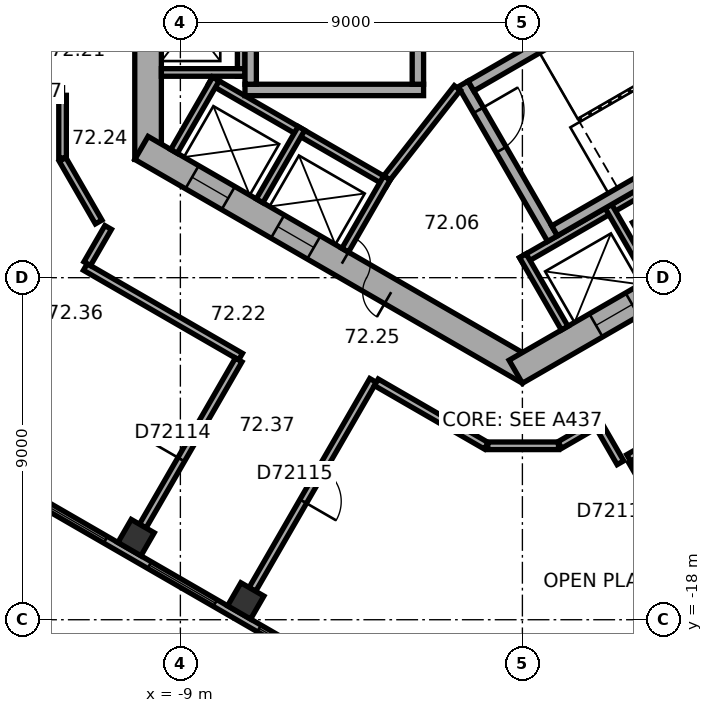
"""IFC4 building model, lengths in metres.
Left out: names, types, materials, properties, quantities, classifications, styles, units other than length and angle.
Written with IfcOpenShell. Run it as: python <this file> out.ifc"""

import sys

from ifc_helpers import new_model, si_unit, direction, frame, frame_2d, origin, origin_2d, place, context, subcontext, project, spatial, rectangle, extrude, element, fill, save


model = new_model("IFC4")
c1 = context("Model", 3, precision=1e-05, world=origin(), true_north=direction((0.0, 1.0)))
c2 = subcontext(c1, "Body", "Model", "MODEL_VIEW")
j1 = project(units=[si_unit("LENGTHUNIT", "METRE"), si_unit("PLANEANGLEUNIT", "RADIAN")], contexts=[c1])
p1 = place(None, origin())
s1 = spatial("IfcSite", under=j1, at=p1, CompositionType="ELEMENT")
p2 = place(p1, origin())
s2 = spatial("IfcBuilding", under=s1, at=p2, CompositionType="ELEMENT")
p3 = place(p2, frame((0.0, 0.0, 293.1)))
s3 = spatial("IfcBuildingStorey", under=s2, at=p3, CompositionType="ELEMENT", Elevation=293.1)
for number, where, z_axis, x_axis in (
    (1, (-10.165, -15.84, 0.0), (0.0, 0.0, 1.0), (0.866, -0.5, 0.0)),
    (2, (-7.28, -17.505, 0.0), (0.0, 0.0, 1.0), (0.866, -0.5, 0.0)),
):
    element("IfcColumn", number, at=place(p3, frame(where, z_axis=z_axis, x_axis=x_axis)), inside=s3, PredefinedType="COLUMN", context=c2, shape_type="SweptSolid", body=[
        extrude(rectangle(XDim=0.7, YDim=0.7, at=origin_2d()), origin(), (0.0, 0.0, 1.0), 3.7),
    ])
p4 = place(p3, frame((-9.85, 5.889, 0.0), z_axis=(0.0, 0.0, 1.0), x_axis=(0.0, -1.0, 0.0)))
e3 = element("IfcWall", 3, at=p4, inside=s3, PredefinedType="SHEAR", context=c2, shape_type="SweptSolid", body=[
    extrude(rectangle(XDim=11.778, YDim=0.7, at=frame_2d((5.889, 0.0))), origin(), (0.0, 0.0, 1.0), 3.7),
])
p5 = place(p4, frame((5.039, 0.0, 0.0)))
e4 = element("IfcOpeningElement", 4, at=p5, cuts=e3, PredefinedType="OPENING", context=c2, shape_type="SweptSolid", body=[
    extrude(rectangle(XDim=1.1, YDim=2.1, at=frame_2d((0.55, 1.05))), frame((0.0, 0.36, 0.0), z_axis=(0.0, -1.0, 0.0), x_axis=(1.0, 0.0, 0.0)), (0.0, 0.0, 1.0), 0.72),
])
p6 = place(p4, frame((7.639, 0.0, 0.0)))
e5 = element("IfcOpeningElement", 5, at=p6, cuts=e3, PredefinedType="OPENING", context=c2, shape_type="SweptSolid", body=[
    extrude(rectangle(XDim=1.1, YDim=2.1, at=frame_2d((0.55, 1.05))), frame((0.0, 0.36, 0.0), z_axis=(0.0, -1.0, 0.0), x_axis=(1.0, 0.0, 0.0)), (0.0, 0.0, 1.0), 0.72),
])
p7 = place(p3, frame((-10.025, -5.586, 0.0), z_axis=(0.0, 0.0, 1.0), x_axis=(0.866026453023, -0.499998182661, 0.0)))
e6 = element("IfcWall", 6, at=p7, inside=s3, PredefinedType="SHEAR", context=c2, shape_type="SweptSolid", body=[
    extrude(rectangle(XDim=11.778, YDim=0.7, at=frame_2d((5.889, 0.0))), origin(), (0.0, 0.0, 1.0), 3.7),
])
p8 = place(p7, frame((6.089, 0.0, 0.0)))
e7 = element("IfcOpeningElement", 7, at=p8, cuts=e6, PredefinedType="OPENING", context=c2, shape_type="SweptSolid", body=[
    extrude(rectangle(XDim=1.5, YDim=2.1, at=frame_2d((0.75, 1.05))), frame((0.0, 0.36, 0.0), z_axis=(0.0, -1.0, 0.0), x_axis=(1.0, 0.0, 0.0)), (0.0, 0.0, 1.0), 0.72),
])
p9 = place(p7, frame((1.539, 0.0, 0.0)))
e8 = element("IfcOpeningElement", 8, at=p9, cuts=e6, PredefinedType="OPENING", context=c2, shape_type="SweptSolid", body=[
    extrude(rectangle(XDim=1.1, YDim=2.1, at=frame_2d((0.55, 1.05))), frame((0.0, 0.36, 0.0), z_axis=(0.0, -1.0, 0.0), x_axis=(1.0, 0.0, 0.0)), (0.0, 0.0, 1.0), 0.72),
])
p10 = place(p7, frame((4.139, 0.0, 0.0)))
e9 = element("IfcOpeningElement", 9, at=p10, cuts=e6, PredefinedType="OPENING", context=c2, shape_type="SweptSolid", body=[
    extrude(rectangle(XDim=1.1, YDim=2.1, at=frame_2d((0.55, 1.05))), frame((0.0, 0.36, 0.0), z_axis=(0.0, -1.0, 0.0), x_axis=(1.0, 0.0, 0.0)), (0.0, 0.0, 1.0), 0.72),
])
p11 = place(p3, frame((-0.175, -11.475, 0.0), z_axis=(0.0, 0.0, 1.0), x_axis=(0.866026453023, 0.499998182661, 0.0)))
e10 = element("IfcWall", 10, at=p11, inside=s3, PredefinedType="SHEAR", context=c2, shape_type="SweptSolid", body=[
    extrude(rectangle(XDim=11.778, YDim=0.7, at=frame_2d((5.889, 0.0))), origin(), (0.0, 0.0, 1.0), 3.7),
])
p12 = place(p11, frame((2.439, 0.0, 0.0)))
e11 = element("IfcOpeningElement", 11, at=p12, cuts=e10, PredefinedType="OPENING", context=c2, shape_type="SweptSolid", body=[
    extrude(rectangle(XDim=1.1, YDim=2.1, at=frame_2d((0.55, 1.05))), frame((0.0, 0.36, 0.0), z_axis=(0.0, -1.0, 0.0), x_axis=(1.0, 0.0, 0.0)), (0.0, 0.0, 1.0), 0.72),
])
p13 = place(p11, frame((5.039, 0.0, 0.0)))
e12 = element("IfcOpeningElement", 12, at=p13, cuts=e10, PredefinedType="OPENING", context=c2, shape_type="SweptSolid", body=[
    extrude(rectangle(XDim=1.1, YDim=2.1, at=frame_2d((0.55, 1.05))), frame((0.0, 0.36, 0.0), z_axis=(0.0, -1.0, 0.0), x_axis=(1.0, 0.0, 0.0)), (0.0, 0.0, 1.0), 0.72),
])
p14 = place(p11, frame((7.639, 0.0, 0.0)))
e13 = element("IfcOpeningElement", 13, at=p14, cuts=e10, PredefinedType="OPENING", context=c2, shape_type="SweptSolid", body=[
    extrude(rectangle(XDim=1.1, YDim=2.1, at=frame_2d((0.55, 1.05))), frame((0.0, 0.36, 0.0), z_axis=(0.0, -1.0, 0.0), x_axis=(1.0, 0.0, 0.0)), (0.0, 0.0, 1.0), 0.72),
])
p15 = place(p3, frame((-16.626, -12.629, 0.0), z_axis=(0.0, 0.0, 1.0), x_axis=(0.866026460444, -0.499998169808, 0.0)))
e14 = element("IfcWall", 14, at=p15, inside=s3, PredefinedType="STANDARD", context=c2, shape_type="SweptSolid", body=[
    extrude(rectangle(XDim=17.731, YDim=0.2, at=frame_2d((8.866, 0.0))), origin(), (0.0, 0.0, 1.0), 3.7),
])
p16 = place(p15, frame((1.203, 0.0, 0.9)))
e15 = element("IfcOpeningElement", 15, at=p16, cuts=e14, PredefinedType="OPENING", context=c2, shape_type="SweptSolid", body=[
    extrude(rectangle(XDim=2.0, YDim=2.0, at=frame_2d((1.0, 1.0))), frame((0.0, 0.11, 0.0), z_axis=(0.0, -1.0, 0.0), x_axis=(1.0, 0.0, 0.0)), (0.0, 0.0, 1.0), 0.22),
])
p17 = place(p15, frame((4.535, 0.0, 0.9)))
e16 = element("IfcOpeningElement", 16, at=p17, cuts=e14, PredefinedType="OPENING", context=c2, shape_type="SweptSolid", body=[
    extrude(rectangle(XDim=2.0, YDim=2.0, at=frame_2d((1.0, 1.0))), frame((0.0, 0.11, 0.0), z_axis=(0.0, -1.0, 0.0), x_axis=(1.0, 0.0, 0.0)), (0.0, 0.0, 1.0), 0.22),
])
p18 = place(p15, frame((7.867, 0.0, 0.9)))
e17 = element("IfcOpeningElement", 17, at=p18, cuts=e14, PredefinedType="OPENING", context=c2, shape_type="SweptSolid", body=[
    extrude(rectangle(XDim=2.0, YDim=2.0, at=frame_2d((1.0, 1.0))), frame((0.0, 0.11, 0.0), z_axis=(0.0, -1.0, 0.0), x_axis=(1.0, 0.0, 0.0)), (0.0, 0.0, 1.0), 0.22),
])
p19 = place(p15, frame((11.198, 0.0, 0.9)))
e18 = element("IfcOpeningElement", 18, at=p19, cuts=e14, PredefinedType="OPENING", context=c2, shape_type="SweptSolid", body=[
    extrude(rectangle(XDim=2.0, YDim=2.0, at=frame_2d((1.0, 1.0))), frame((0.0, 0.11, 0.0), z_axis=(0.0, -1.0, 0.0), x_axis=(1.0, 0.0, 0.0)), (0.0, 0.0, 1.0), 0.22),
])
p20 = place(p15, frame((14.53, 0.0, 0.9)))
e19 = element("IfcOpeningElement", 19, at=p20, cuts=e14, PredefinedType="OPENING", context=c2, shape_type="SweptSolid", body=[
    extrude(rectangle(XDim=2.0, YDim=2.0, at=frame_2d((1.0, 1.0))), frame((0.0, 0.11, 0.0), z_axis=(0.0, -1.0, 0.0), x_axis=(1.0, 0.0, 0.0)), (0.0, 0.0, 1.0), 0.22),
])
p21 = place(p3, frame((2.58, -21.377, 0.0), z_axis=(0.0, 0.0, 1.0), x_axis=(0.833888592176, 0.551932800112, 0.0)))
e20 = element("IfcWall", 20, at=p21, inside=s3, PredefinedType="STANDARD", context=c2, shape_type="SweptSolid", body=[
    extrude(rectangle(XDim=17.731, YDim=0.2, at=frame_2d((8.866, 0.0))), origin(), (0.0, 0.0, 1.0), 3.7),
])
p22 = place(p21, frame((1.202, 0.0, 0.9)))
e21 = element("IfcOpeningElement", 21, at=p22, cuts=e20, PredefinedType="OPENING", context=c2, shape_type="SweptSolid", body=[
    extrude(rectangle(XDim=2.0, YDim=2.0, at=frame_2d((1.0, 1.0))), frame((0.0, 0.11, 0.0), z_axis=(0.0, -1.0, 0.0), x_axis=(1.0, 0.0, 0.0)), (0.0, 0.0, 1.0), 0.22),
])
p23 = place(p21, frame((4.533, 0.0, 0.9)))
e22 = element("IfcOpeningElement", 22, at=p23, cuts=e20, PredefinedType="OPENING", context=c2, shape_type="SweptSolid", body=[
    extrude(rectangle(XDim=2.0, YDim=2.0, at=frame_2d((1.0, 1.0))), frame((0.0, 0.11, 0.0), z_axis=(0.0, -1.0, 0.0), x_axis=(1.0, 0.0, 0.0)), (0.0, 0.0, 1.0), 0.22),
])
p24 = place(p21, frame((7.865, 0.0, 0.9)))
e23 = element("IfcOpeningElement", 23, at=p24, cuts=e20, PredefinedType="OPENING", context=c2, shape_type="SweptSolid", body=[
    extrude(rectangle(XDim=2.0, YDim=2.0, at=frame_2d((1.0, 1.0))), frame((0.0, 0.11, 0.0), z_axis=(0.0, -1.0, 0.0), x_axis=(1.0, 0.0, 0.0)), (0.0, 0.0, 1.0), 0.22),
])
p25 = place(p21, frame((11.197, 0.0, 0.9)))
e24 = element("IfcOpeningElement", 24, at=p25, cuts=e20, PredefinedType="OPENING", context=c2, shape_type="SweptSolid", body=[
    extrude(rectangle(XDim=2.0, YDim=2.0, at=frame_2d((1.0, 1.0))), frame((0.0, 0.11, 0.0), z_axis=(0.0, -1.0, 0.0), x_axis=(1.0, 0.0, 0.0)), (0.0, 0.0, 1.0), 0.22),
])
p26 = place(p21, frame((14.528, 0.0, 0.9)))
e25 = element("IfcOpeningElement", 25, at=p26, cuts=e20, PredefinedType="OPENING", context=c2, shape_type="SweptSolid", body=[
    extrude(rectangle(XDim=2.0, YDim=2.0, at=frame_2d((1.0, 1.0))), frame((0.0, 0.11, 0.0), z_axis=(0.0, -1.0, 0.0), x_axis=(1.0, 0.0, 0.0)), (0.0, 0.0, 1.0), 0.22),
])
p27 = place(p3, frame((-7.4, 4.3, 0.0), z_axis=(0.0, 0.0, 1.0), x_axis=(0.0, -1.0, 0.0)))
e26 = element("IfcWall", 26, at=p27, inside=s3, PredefinedType="PARTITIONING", context=c2, shape_type="SweptSolid", body=[
    extrude(rectangle(XDim=8.0, YDim=0.2, at=frame_2d((4.0, 0.0))), origin(), (0.0, 0.0, 1.0), 3.42),
])
p28 = place(p3, frame((-7.3, -3.6, 0.0), z_axis=(0.0, 0.0, 1.0), x_axis=(-1.0, 0.0, 0.0)))
e27 = element("IfcWall", 27, at=p28, inside=s3, PredefinedType="PARTITIONING", context=c2, shape_type="SweptSolid", body=[
    extrude(rectangle(XDim=2.2, YDim=0.2, at=frame_2d((1.1, 0.0))), origin(), (0.0, 0.0, 1.0), 3.42),
])
p29 = place(p3, frame((-8.203, -3.809, 0.0), z_axis=(0.0, 0.0, 1.0), x_axis=(0.866028230842, -0.499995103361, 0.0)))
e28 = element("IfcWall", 28, at=p29, inside=s3, PredefinedType="PARTITIONING", context=c2, shape_type="SweptSolid", body=[
    extrude(rectangle(XDim=5.4, YDim=0.2, at=frame_2d((2.7, 0.0))), origin(), (0.0, 0.0, 1.0), 3.42),
])
for number, where, z_axis, x_axis in (
    (29, (-8.067, -3.772, 0.0), (0.0, 0.0, 1.0), (-0.5, -0.866, 0.0)),
    (30, (-5.815, -5.072, 0.0), (0.0, 0.0, 1.0), (-0.5, -0.866, 0.0)),
):
    element("IfcWall", number, at=place(p3, frame(where, z_axis=z_axis, x_axis=x_axis)), inside=s3, PredefinedType="PARTITIONING", context=c2, shape_type="SweptSolid", body=[
        extrude(rectangle(XDim=2.2, YDim=0.2, at=frame_2d((1.1, 0.0))), origin(), (0.0, 0.0, 1.0), 3.42),
    ])
p30 = place(p3, frame((-3.563, -6.372, 0.0), z_axis=(0.0, 0.0, 1.0), x_axis=(-0.499994660107, -0.866028486751, 0.0)))
e31 = element("IfcWall", 31, at=p30, inside=s3, PredefinedType="PARTITIONING", context=c2, shape_type="SweptSolid", body=[
    extrude(rectangle(XDim=2.2, YDim=0.2, at=frame_2d((1.1, 0.0))), origin(), (0.0, 0.0, 1.0), 3.42),
])
p31 = place(p3, frame((-0.024, -8.559, 0.0), z_axis=(0.0, 0.0, 1.0), x_axis=(0.866026010844, 0.49999894854, 0.0)))
e32 = element("IfcWall", 32, at=p31, inside=s3, PredefinedType="PARTITIONING", context=c2, shape_type="SweptSolid", body=[
    extrude(rectangle(XDim=8.0, YDim=0.2, at=frame_2d((4.0, 0.0))), origin(), (0.0, 0.0, 1.0), 3.42),
])
for number, where, z_axis, x_axis in (
    (33, (0.013, -8.422, 0.0), (0.0, 0.0, 1.0), (0.5, -0.866, 0.0)),
    (34, (2.264, -7.122, 0.0), (0.0, 0.0, 1.0), (0.5, -0.866, 0.0)),
):
    element("IfcWall", number, at=place(p3, frame(where, z_axis=z_axis, x_axis=x_axis)), inside=s3, PredefinedType="PARTITIONING", context=c2, shape_type="SweptSolid", body=[
        extrude(rectangle(XDim=2.2, YDim=0.2, at=frame_2d((1.1, 0.0))), origin(), (0.0, 0.0, 1.0), 3.42),
    ])
p32 = place(p3, frame((-2.6, -4.06, 0.0), z_axis=(0.0, 0.0, 1.0), x_axis=(-1.0, 0.0, 0.0)))
e35 = element("IfcWall", 35, at=p32, inside=s3, PredefinedType="SHEAR", context=c2, shape_type="SweptSolid", body=[
    extrude(rectangle(XDim=4.7, YDim=0.3, at=frame_2d((2.35, 0.0))), origin(), (0.0, 0.0, 1.0), 3.42),
])
for number, where, z_axis, x_axis in (
    (36, (-2.75, 3.15, 0.0), (0.0, 0.0, 1.0), (0.0, -1.0, 0.0)),
    (37, (-7.15, 3.15, 0.0), (0.0, 0.0, 1.0), (0.0, -1.0, 0.0)),
):
    element("IfcWall", number, at=place(p3, frame(where, z_axis=z_axis, x_axis=x_axis)), inside=s3, PredefinedType="SHEAR", context=c2, shape_type="SweptSolid", body=[
        extrude(rectangle(XDim=7.06, YDim=0.3, at=frame_2d((3.53, 0.0))), origin(), (0.0, 0.0, 1.0), 3.42),
    ])
p33 = place(p3, frame((-1.558, -3.902, 0.0), z_axis=(0.0, 0.0, 1.0), x_axis=(0.499977259774, -0.866038532462, 0.0)))
e38 = element("IfcWall", 38, at=p33, inside=s3, PredefinedType="SHEAR", context=c2, shape_type="SweptSolid", body=[
    extrude(rectangle(XDim=4.7, YDim=0.3, at=frame_2d((2.35, 0.0))), origin(), (0.0, 0.0, 1.0), 3.42),
])
p34 = place(p33, frame((0.8, 0.0, 0.0)))
e39 = element("IfcOpeningElement", 39, at=p34, cuts=e38, PredefinedType="OPENING", context=c2, shape_type="SweptSolid", body=[
    extrude(rectangle(XDim=1.2, YDim=2.1, at=frame_2d((0.6, 1.05))), frame((0.0, 0.16, 0.0), z_axis=(0.0, -1.0, 0.0), x_axis=(1.0, 0.0, 0.0)), (0.0, 0.0, 1.0), 0.32),
])
for number, where, z_axis, x_axis in (
    (40, (-1.353, -3.957, 0.0), (0.0, 0.0, 1.0), (0.866, 0.5, 0.0)),
    (41, (0.847, -7.767, 0.0), (0.0, 0.0, 1.0), (0.866, 0.5, 0.0)),
):
    element("IfcWall", number, at=place(p3, frame(where, z_axis=z_axis, x_axis=x_axis)), inside=s3, PredefinedType="SHEAR", context=c2, shape_type="SweptSolid", body=[
        extrude(rectangle(XDim=7.06, YDim=0.3, at=frame_2d((3.53, 0.0))), origin(), (0.0, 0.0, 1.0), 3.42),
    ])
p35 = place(p3, frame((-1.712, -4.008, 0.0), z_axis=(0.0, 0.0, 1.0), x_axis=(-0.616549420702, -0.787316208287, 0.0)))
e42 = element("IfcWall", 42, at=p35, inside=s3, PredefinedType="PARTITIONING", context=c2, shape_type="SweptSolid", body=[
    extrude(rectangle(XDim=3.002, YDim=0.2, at=frame_2d((1.501, 0.0))), origin(), (0.0, 0.0, 1.0), 3.42),
])
p36 = place(p3, frame((-13.301, -4.101, 0.0), z_axis=(0.0, 0.0, 1.0), x_axis=(1.0, 0.0, 0.0)))
e43 = element("IfcWall", 43, at=p36, inside=s3, PredefinedType="PARTITIONING", context=c2, shape_type="SweptSolid", body=[
    extrude(rectangle(XDim=1.201, YDim=0.2, at=frame_2d((0.601, 0.0))), origin(), (0.0, 0.0, 1.0), 3.42),
])
p37 = place(p3, frame((-12.1, -5.889, 0.0), z_axis=(0.0, 0.0, 1.0), x_axis=(0.500063520245, -0.865988727248, 0.0)))
e44 = element("IfcWall", 44, at=p37, inside=s3, PredefinedType="PARTITIONING", context=c2, shape_type="SweptSolid", body=[
    extrude(rectangle(XDim=1.9, YDim=0.2, at=frame_2d((0.95, 0.0))), origin(), (0.0, 0.0, 1.0), 3.42),
])
p38 = place(p3, frame((-12.1, -4.201, 0.0), z_axis=(0.0, 0.0, 1.0), x_axis=(0.0, -1.0, 0.0)))
e45 = element("IfcWall", 45, at=p38, inside=s3, PredefinedType="PARTITIONING", context=c2, shape_type="SweptSolid", body=[
    extrude(rectangle(XDim=1.648, YDim=0.2, at=frame_2d((0.824, 0.0))), origin(), (0.0, 0.0, 1.0), 3.42),
])
p39 = place(p3, frame((-11.501, -8.719, 0.0), z_axis=(0.0, 0.0, 1.0), x_axis=(0.866024434742, -0.500001678427, 0.0)))
e46 = element("IfcWall", 46, at=p39, inside=s3, PredefinedType="PARTITIONING", context=c2, shape_type="SweptSolid", body=[
    extrude(rectangle(XDim=4.718, YDim=0.2, at=frame_2d((2.359, 0.0))), origin(), (0.0, 0.0, 1.0), 3.42),
])
p40 = place(p3, frame((-10.901, -7.678, 0.0), z_axis=(0.0, 0.0, 1.0), x_axis=(-0.500074377092, -0.865982457891, 0.0)))
e47 = element("IfcWall", 47, at=p40, inside=s3, PredefinedType="PARTITIONING", context=c2, shape_type="SweptSolid", body=[
    extrude(rectangle(XDim=1.101, YDim=0.2, at=frame_2d((0.55, 0.0))), origin(), (0.0, 0.0, 1.0), 3.42),
])
p41 = place(p3, frame((-9.99, -15.537, 0.0), z_axis=(0.0, 0.0, 1.0), x_axis=(0.499966611936, 0.866044679534, 0.0)))
e48 = element("IfcWall", 48, at=p41, inside=s3, PredefinedType="PARTITIONING", context=c2, shape_type="SweptSolid", body=[
    extrude(rectangle(XDim=5.049, YDim=0.2, at=frame_2d((2.524, 0.0))), origin(), (0.0, 0.0, 1.0), 2.87),
])
p42 = place(p41, frame((2.024, 0.0, 0.0)))
e49 = element("IfcOpeningElement", 49, at=p42, cuts=e48, PredefinedType="OPENING", context=c2, shape_type="SweptSolid", body=[
    extrude(rectangle(XDim=1.0, YDim=2.1, at=frame_2d((0.5, 1.05))), frame((0.0, 0.11, 0.0), z_axis=(0.0, -1.0, 0.0), x_axis=(1.0, 0.0, 0.0)), (0.0, 0.0, 1.0), 0.22),
])
p43 = place(p3, frame((-7.105, -17.202, 0.0), z_axis=(0.0, 0.0, 1.0), x_axis=(0.499988692146, 0.866031932279, 0.0)))
e50 = element("IfcWall", 50, at=p43, inside=s3, PredefinedType="PARTITIONING", context=c2, shape_type="SweptSolid", body=[
    extrude(rectangle(XDim=6.35, YDim=0.2, at=frame_2d((3.175, 0.0))), origin(), (0.0, 0.0, 1.0), 3.42),
])
p44 = place(p43, frame((2.675, 0.0, 0.0)))
e51 = element("IfcOpeningElement", 51, at=p44, cuts=e50, PredefinedType="OPENING", context=c2, shape_type="SweptSolid", body=[
    extrude(rectangle(XDim=1.0, YDim=2.1, at=frame_2d((0.5, 1.05))), frame((0.0, 0.11, 0.0), z_axis=(0.0, -1.0, 0.0), x_axis=(1.0, 0.0, 0.0)), (0.0, 0.0, 1.0), 0.22),
])
p45 = place(p3, frame((-3.843, -11.753, 0.0), z_axis=(0.0, 0.0, 1.0), x_axis=(0.866031037473, -0.499990242038, 0.0)))
e52 = element("IfcWall", 52, at=p45, inside=s3, PredefinedType="PARTITIONING", context=c2, shape_type="SweptSolid", body=[
    extrude(rectangle(XDim=3.341, YDim=0.2, at=frame_2d((1.67, 0.0))), origin(), (0.0, 0.0, 1.0), 3.42),
])
p46 = place(p3, frame((-0.91, -13.423, 0.0), z_axis=(0.0, 0.0, 1.0), x_axis=(1.0, 0.0, 0.0)))
e53 = element("IfcWall", 53, at=p46, inside=s3, PredefinedType="PARTITIONING", context=c2, shape_type="SweptSolid", body=[
    extrude(rectangle(XDim=1.86, YDim=0.2, at=frame_2d((0.93, 0.0))), origin(), (0.0, 0.0, 1.0), 3.42),
])
p47 = place(p3, frame((0.985, -13.403, 0.0), z_axis=(0.0, 0.0, 1.0), x_axis=(0.866022668282, 0.500004737999, 0.0)))
e54 = element("IfcWall", 54, at=p47, inside=s3, PredefinedType="PARTITIONING", context=c2, shape_type="SweptSolid", body=[
    extrude(rectangle(XDim=1.148, YDim=0.2, at=frame_2d((0.574, 0.0))), origin(), (0.0, 0.0, 1.0), 3.42),
])
p48 = place(p3, frame((2.029, -12.916, 0.0), z_axis=(0.0, 0.0, 1.0), x_axis=(0.500074377092, -0.865982457891, 0.0)))
e55 = element("IfcWall", 55, at=p48, inside=s3, PredefinedType="PARTITIONING", context=c2, shape_type="SweptSolid", body=[
    extrude(rectangle(XDim=1.101, YDim=0.2, at=frame_2d((0.55, 0.0))), origin(), (0.0, 0.0, 1.0), 3.42),
])
p49 = place(p3, frame((2.796, -13.744, 0.0), z_axis=(0.0, 0.0, 1.0), x_axis=(0.86605622881, 0.499946605688, 0.0)))
e56 = element("IfcWall", 56, at=p49, inside=s3, PredefinedType="PARTITIONING", context=c2, shape_type="SweptSolid", body=[
    extrude(rectangle(XDim=2.2, YDim=0.2, at=frame_2d((1.1, 0.0))), origin(), (0.0, 0.0, 1.0), 3.42),
])
p50 = place(p3, frame((4.096, -15.996, 0.0), z_axis=(0.0, 0.0, 1.0), x_axis=(-0.500004234368, 0.866022959057, 0.0)))
e57 = element("IfcWall", 57, at=p50, inside=s3, PredefinedType="PARTITIONING", context=c2, shape_type="SweptSolid", body=[
    extrude(rectangle(XDim=2.5, YDim=0.12, at=frame_2d((1.25, 0.0))), origin(), (0.0, 0.0, 1.0), 3.42),
])
p51 = place(p50, frame((0.8, 0.0, 0.0)))
e58 = element("IfcOpeningElement", 58, at=p51, cuts=e57, PredefinedType="OPENING", context=c2, shape_type="SweptSolid", body=[
    extrude(rectangle(XDim=0.9, YDim=2.1, at=frame_2d((0.45, 1.05))), frame((0.0, 0.07, 0.0), z_axis=(0.0, -1.0, 0.0), x_axis=(1.0, 0.0, 0.0)), (0.0, 0.0, 1.0), 0.14),
])
p52 = place(p17, origin())
e59 = element("IfcWindow", 59, at=p52, inside=s3, PartitioningType="SINGLE_PANEL", PredefinedType="WINDOW", context=c2, shape_type="SweptSolid", body=[
    extrude(rectangle(XDim=2.0, YDim=2.0, at=frame_2d((1.0, 1.0))), frame((0.0, 0.03, 0.0), z_axis=(0.0, -1.0, 0.0), x_axis=(1.0, 0.0, 0.0)), (0.0, 0.0, 1.0), 0.06),
])
fill(e16, e59)
p53 = place(p18, origin())
e60 = element("IfcWindow", 60, at=p53, inside=s3, PartitioningType="SINGLE_PANEL", PredefinedType="WINDOW", context=c2, shape_type="SweptSolid", body=[
    extrude(rectangle(XDim=2.0, YDim=2.0, at=frame_2d((1.0, 1.0))), frame((0.0, 0.03, 0.0), z_axis=(0.0, -1.0, 0.0), x_axis=(1.0, 0.0, 0.0)), (0.0, 0.0, 1.0), 0.06),
])
fill(e17, e60)
p54 = place(p19, origin())
e61 = element("IfcWindow", 61, at=p54, inside=s3, PartitioningType="SINGLE_PANEL", PredefinedType="WINDOW", context=c2, shape_type="SweptSolid", body=[
    extrude(rectangle(XDim=2.0, YDim=2.0, at=frame_2d((1.0, 1.0))), frame((0.0, 0.03, 0.0), z_axis=(0.0, -1.0, 0.0), x_axis=(1.0, 0.0, 0.0)), (0.0, 0.0, 1.0), 0.06),
])
fill(e18, e61)
p55 = place(p8, origin())
e62 = element("IfcDoor", 62, at=p55, inside=s3, OperationType="DOUBLE_DOOR_SINGLE_SWING", PredefinedType="DOOR", context=c2, shape_type="SweptSolid", body=[
    extrude(rectangle(XDim=1.5, YDim=2.1, at=frame_2d((0.75, 1.05))), frame((0.0, 0.025, 0.0), z_axis=(0.0, -1.0, 0.0), x_axis=(1.0, 0.0, 0.0)), (0.0, 0.0, 1.0), 0.05),
])
fill(e7, e62)
p56 = place(p34, origin())
e63 = element("IfcDoor", 63, at=p56, inside=s3, OperationType="SINGLE_SWING_RIGHT", PredefinedType="DOOR", context=c2, shape_type="SweptSolid", body=[
    extrude(rectangle(XDim=1.2, YDim=2.1, at=frame_2d((0.6, 1.05))), frame((0.0, 0.025, 0.0), z_axis=(0.0, -1.0, 0.0), x_axis=(1.0, 0.0, 0.0)), (0.0, 0.0, 1.0), 0.05),
])
fill(e39, e63)
p57 = place(p9, origin())
e64 = element("IfcDoor", 64, at=p57, inside=s3, OperationType="DOUBLE_DOOR_SLIDING", PredefinedType="DOOR", context=c2, shape_type="SweptSolid", body=[
    extrude(rectangle(XDim=1.1, YDim=2.1, at=frame_2d((0.55, 1.05))), frame((0.0, 0.025, 0.0), z_axis=(0.0, -1.0, 0.0), x_axis=(1.0, 0.0, 0.0)), (0.0, 0.0, 1.0), 0.05),
])
fill(e8, e64)
p58 = place(p10, origin())
e65 = element("IfcDoor", 65, at=p58, inside=s3, OperationType="DOUBLE_DOOR_SLIDING", PredefinedType="DOOR", context=c2, shape_type="SweptSolid", body=[
    extrude(rectangle(XDim=1.1, YDim=2.1, at=frame_2d((0.55, 1.05))), frame((0.0, 0.025, 0.0), z_axis=(0.0, -1.0, 0.0), x_axis=(1.0, 0.0, 0.0)), (0.0, 0.0, 1.0), 0.05),
])
fill(e9, e65)
p59 = place(p12, origin())
e66 = element("IfcDoor", 66, at=p59, inside=s3, OperationType="DOUBLE_DOOR_SLIDING", PredefinedType="DOOR", context=c2, shape_type="SweptSolid", body=[
    extrude(rectangle(XDim=1.1, YDim=2.1, at=frame_2d((0.55, 1.05))), frame((0.0, 0.025, 0.0), z_axis=(0.0, -1.0, 0.0), x_axis=(1.0, 0.0, 0.0)), (0.0, 0.0, 1.0), 0.05),
])
fill(e11, e66)
p60 = place(p42, origin())
e67 = element("IfcDoor", 67, at=p60, inside=s3, OperationType="SINGLE_SWING_LEFT", PredefinedType="DOOR", context=c2, shape_type="SweptSolid", body=[
    extrude(rectangle(XDim=1.0, YDim=2.1, at=frame_2d((0.5, 1.05))), frame((0.0, 0.025, 0.0), z_axis=(0.0, -1.0, 0.0), x_axis=(1.0, 0.0, 0.0)), (0.0, 0.0, 1.0), 0.05),
])
fill(e49, e67)
p61 = place(p44, origin())
e68 = element("IfcDoor", 68, at=p61, inside=s3, OperationType="SINGLE_SWING_LEFT", PredefinedType="DOOR", context=c2, shape_type="SweptSolid", body=[
    extrude(rectangle(XDim=1.0, YDim=2.1, at=frame_2d((0.5, 1.05))), frame((0.0, 0.025, 0.0), z_axis=(0.0, -1.0, 0.0), x_axis=(1.0, 0.0, 0.0)), (0.0, 0.0, 1.0), 0.05),
])
fill(e51, e68)
save(model, sys.argv[1])
